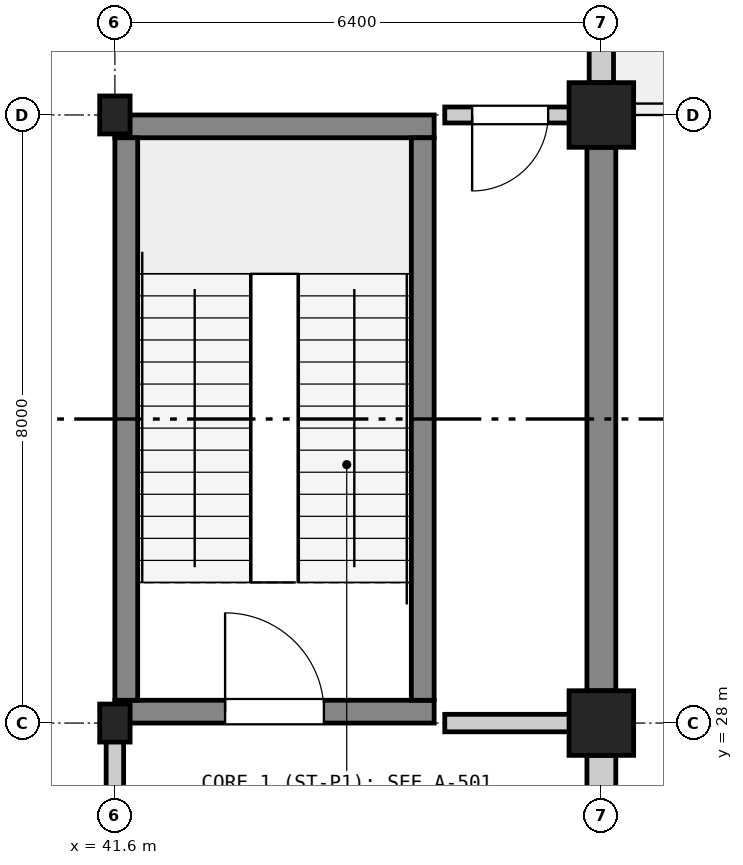
"""IFC4 building model, lengths in metres.
Left out: names, types, materials, properties, quantities, classifications, styles, units other than length and angle.
Written with IfcOpenShell. Run it as: python <this file> out.ifc"""

import sys

from ifc_helpers import new_model, si_unit, direction, frame, frame_2d, origin, origin_2d, place, context, subcontext, project, spatial, rectangle, extrude, element, fill, save


model = new_model("IFC4")
c1 = context("Model", 3, precision=1e-05, world=origin(), true_north=direction((0.0, 1.0)))
c2 = subcontext(c1, "Body", "Model", "MODEL_VIEW")
j1 = project(units=[si_unit("LENGTHUNIT", "METRE"), si_unit("PLANEANGLEUNIT", "RADIAN")], contexts=[c1])
p1 = place(None, origin())
s1 = spatial("IfcSite", under=j1, at=p1, CompositionType="ELEMENT")
p2 = place(p1, origin())
s2 = spatial("IfcBuilding", under=s1, at=p2, CompositionType="ELEMENT")
p3 = place(p2, frame((0.0, 0.0, 5.4)))
s3 = spatial("IfcBuildingStorey", under=s2, at=p3, CompositionType="ELEMENT", Elevation=5.4)
for number, where, z_axis, x_axis in (
    (1, (41.6, 28.0, 0.0), (0.0, 0.0, 1.0), (1.0, 0.0, 0.0)),
    (2, (41.6, 36.0, 0.0), (0.0, 0.0, 1.0), (1.0, 0.0, 0.0)),
):
    element("IfcColumn", number, at=place(p3, frame(where, z_axis=z_axis, x_axis=x_axis)), inside=s3, PredefinedType="COLUMN", context=c2, shape_type="SweptSolid", body=[
        extrude(rectangle(XDim=0.4, YDim=0.5, at=origin_2d()), origin(), (0.0, 0.0, 1.0), 5.4),
    ])
for number, where, z_axis, x_axis in (
    (3, (48.0, 28.0, 0.0), (0.0, 0.0, 1.0), (1.0, 0.0, 0.0)),
    (4, (48.0, 36.0, 0.0), (0.0, 0.0, 1.0), (1.0, 0.0, 0.0)),
):
    element("IfcColumn", number, at=place(p3, frame(where, z_axis=z_axis, x_axis=x_axis)), inside=s3, PredefinedType="COLUMN", context=c2, shape_type="SweptSolid", body=[
        extrude(rectangle(XDim=0.85, YDim=0.85, at=origin_2d()), origin(), (0.0, 0.0, 1.0), 5.4),
    ])
p4 = place(p3, frame((48.0, 13.1, 0.0), z_axis=(0.0, 0.0, 1.0), x_axis=(0.0, 1.0, 0.0)))
e5 = element("IfcWall", 5, at=p4, inside=s3, PredefinedType="SOLIDWALL", context=c2, shape_type="SweptSolid", body=[
    extrude(rectangle(XDim=14.475, YDim=0.38, at=frame_2d((7.237, 0.0))), origin(), (0.0, 0.0, 1.0), 4.025),
])
p5 = place(p4, frame((6.238, 0.0, 0.9)))
e6 = element("IfcOpeningElement", 6, at=p5, cuts=e5, PredefinedType="OPENING", context=c2, shape_type="SweptSolid", body=[
    extrude(rectangle(XDim=2.0, YDim=1.65, at=frame_2d((1.0, 0.825))), frame((0.0, 0.202, 0.0), z_axis=(0.0, -1.0, 0.0), x_axis=(1.0, 0.0, 0.0)), (0.0, 0.0, 1.0), 0.404),
])
p6 = place(p3, frame((48.0, 28.425, 0.0), z_axis=(0.0, 0.0, 1.0), x_axis=(0.0, 1.0, 0.0)))
e7 = element("IfcWall", 7, at=p6, inside=s3, PredefinedType="SOLIDWALL", context=c2, shape_type="SweptSolid", body=[
    extrude(rectangle(XDim=7.15, YDim=0.38, at=frame_2d((3.575, 0.0))), origin(), (0.0, 0.0, 1.0), 4.515),
])
p7 = place(p3, frame((48.0, 36.425, 0.0), z_axis=(0.0, 0.0, 1.0), x_axis=(0.0, 1.0, 0.0)))
e8 = element("IfcWall", 8, at=p7, inside=s3, PredefinedType="SOLIDWALL", context=c2, shape_type="SweptSolid", body=[
    extrude(rectangle(XDim=6.375, YDim=0.32, at=frame_2d((3.188, 0.0))), origin(), (0.0, 0.0, 1.0), 4.44),
])
p8 = place(p7, frame((1.788, 0.0, 0.9)))
e9 = element("IfcOpeningElement", 9, at=p8, cuts=e8, PredefinedType="OPENING", context=c2, shape_type="SweptSolid", body=[
    extrude(rectangle(XDim=1.1, YDim=1.55, at=frame_2d((0.55, 0.775))), frame((0.0, 0.172, 0.0), z_axis=(0.0, -1.0, 0.0), x_axis=(1.0, 0.0, 0.0)), (0.0, 0.0, 1.0), 0.344),
])
p9 = place(p3, frame((41.6, 28.15, 0.0), z_axis=(0.0, 0.0, 1.0), x_axis=(1.0, 0.0, 0.0)))
e10 = element("IfcWall", 10, at=p9, inside=s3, PredefinedType="SHEAR", context=c2, shape_type="SweptSolid", body=[
    extrude(rectangle(XDim=4.2, YDim=0.3, at=frame_2d((2.1, 0.0))), origin(), (0.0, 0.0, 1.0), 5.1),
])
p10 = place(p9, frame((1.45, 0.0, 0.0)))
e11 = element("IfcOpeningElement", 11, at=p10, cuts=e10, PredefinedType="OPENING", context=c2, shape_type="SweptSolid", body=[
    extrude(rectangle(XDim=1.3, YDim=2.18, at=frame_2d((0.65, 1.09))), frame((0.0, 0.162, 0.0), z_axis=(0.0, -1.0, 0.0), x_axis=(1.0, 0.0, 0.0)), (0.0, 0.0, 1.0), 0.324),
])
p11 = place(p3, frame((41.6, 35.85, 0.0), z_axis=(0.0, 0.0, 1.0), x_axis=(1.0, 0.0, 0.0)))
e12 = element("IfcWall", 12, at=p11, inside=s3, PredefinedType="SHEAR", context=c2, shape_type="SweptSolid", body=[
    extrude(rectangle(XDim=4.2, YDim=0.3, at=frame_2d((2.1, 0.0))), origin(), (0.0, 0.0, 1.0), 5.1),
])
for number, where, z_axis, x_axis in (
    (13, (41.75, 28.3, 0.0), (0.0, 0.0, 1.0), (0.0, 1.0, 0.0)),
    (14, (45.65, 28.3, 0.0), (0.0, 0.0, 1.0), (0.0, 1.0, 0.0)),
):
    element("IfcWall", number, at=place(p3, frame(where, z_axis=z_axis, x_axis=x_axis)), inside=s3, PredefinedType="SHEAR", context=c2, shape_type="SweptSolid", body=[
        extrude(rectangle(XDim=7.4, YDim=0.3, at=frame_2d((3.7, 0.0))), origin(), (0.0, 0.0, 1.0), 5.1),
    ])
p12 = place(p3, frame((45.94, 28.0, 0.0), z_axis=(0.0, 0.0, 1.0), x_axis=(1.0, 0.0, 0.0)))
e15 = element("IfcWall", 15, at=p12, inside=s3, PredefinedType="SOLIDWALL", context=c2, shape_type="SweptSolid", body=[
    extrude(rectangle(XDim=1.955, YDim=0.23, at=frame_2d((0.978, 0.0))), origin(), (0.0, 0.0, 1.0), 4.435),
])
p13 = place(p3, frame((41.6, 24.34, 0.0), z_axis=(0.0, 0.0, 1.0), x_axis=(0.0, 1.0, 0.0)))
e16 = element("IfcWall", 16, at=p13, inside=s3, PredefinedType="SOLIDWALL", context=c2, shape_type="SweptSolid", body=[
    extrude(rectangle(XDim=3.52, YDim=0.23, at=frame_2d((1.76, 0.0))), origin(), (0.0, 0.0, 1.0), 3.885),
])
p14 = place(p13, frame((0.56, 0.0, 0.0)))
e17 = element("IfcOpeningElement", 17, at=p14, cuts=e16, PredefinedType="OPENING", context=c2, shape_type="SweptSolid", body=[
    extrude(rectangle(XDim=1.4, YDim=2.2, at=frame_2d((0.7, 1.1))), frame((0.0, 0.127, 0.0), z_axis=(0.0, -1.0, 0.0), x_axis=(1.0, 0.0, 0.0)), (0.0, 0.0, 1.0), 0.254),
])
p15 = place(p3, frame((45.94, 36.0, 0.0), z_axis=(0.0, 0.0, 1.0), x_axis=(1.0, 0.0, 0.0)))
e18 = element("IfcWall", 18, at=p15, inside=s3, PredefinedType="SOLIDWALL", context=c2, shape_type="SweptSolid", body=[
    extrude(rectangle(XDim=1.955, YDim=0.21, at=frame_2d((0.978, 0.0))), origin(), (0.0, 0.0, 1.0), 4.385),
])
p16 = place(p15, frame((0.36, 0.0, 0.0)))
e19 = element("IfcOpeningElement", 19, at=p16, cuts=e18, PredefinedType="OPENING", context=c2, shape_type="SweptSolid", body=[
    extrude(rectangle(XDim=1.0, YDim=2.15, at=frame_2d((0.5, 1.075))), frame((0.0, 0.117, 0.0), z_axis=(0.0, -1.0, 0.0), x_axis=(1.0, 0.0, 0.0)), (0.0, 0.0, 1.0), 0.234),
])
p17 = place(p10, origin())
e20 = element("IfcDoor", 20, at=p17, inside=s3, OperationType="SINGLE_SWING_LEFT", PredefinedType="DOOR", context=c2, shape_type="SweptSolid", body=[
    extrude(rectangle(XDim=1.3, YDim=2.18, at=frame_2d((0.65, 1.09))), frame((0.0, 0.025, 0.0), z_axis=(0.0, -1.0, 0.0), x_axis=(1.0, 0.0, 0.0)), (0.0, 0.0, 1.0), 0.05),
])
fill(e11, e20)
p18 = place(p16, frame((1.0, 0.0, 0.0), z_axis=(0.0, 0.0, 1.0), x_axis=(-1.0, 0.0, 0.0)))
e21 = element("IfcDoor", 21, at=p18, inside=s3, OperationType="SINGLE_SWING_RIGHT", PredefinedType="DOOR", context=c2, shape_type="SweptSolid", body=[
    extrude(rectangle(XDim=1.0, YDim=2.15, at=frame_2d((0.5, 1.075))), frame((0.0, 0.025, 0.0), z_axis=(0.0, -1.0, 0.0), x_axis=(1.0, 0.0, 0.0)), (0.0, 0.0, 1.0), 0.05),
])
fill(e19, e21)
save(model, sys.argv[1])
